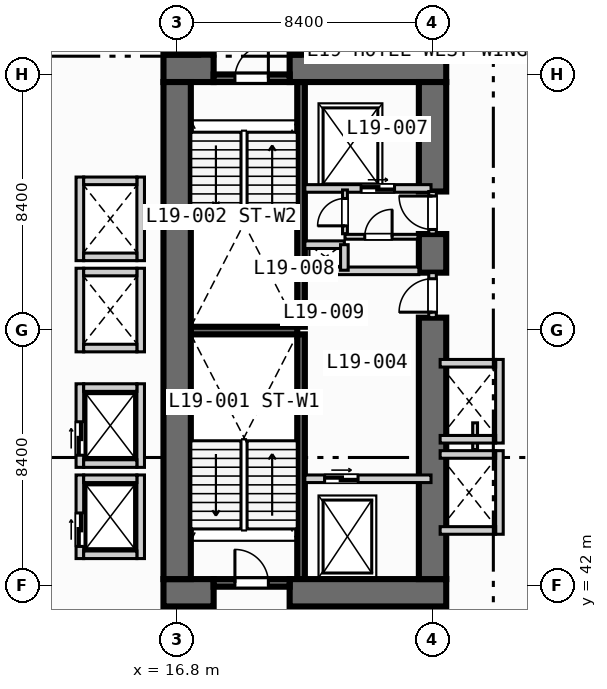
"""IFC4 building model, lengths in metres.
Left out: names, types, materials, properties, quantities, classifications, styles, units other than length and angle.
Written with IfcOpenShell. Run it as: python <this file> out.ifc"""

import sys

from ifc_helpers import new_model, si_unit, direction, frame, frame_2d, origin, place, context, subcontext, project, spatial, rectangle, extrude, element, fill, save


model = new_model("IFC4")
c1 = context("Model", 3, precision=1e-05, world=origin(), true_north=direction((0.0, 1.0)))
c2 = subcontext(c1, "Body", "Model", "MODEL_VIEW")
j1 = project(units=[si_unit("LENGTHUNIT", "METRE"), si_unit("PLANEANGLEUNIT", "RADIAN")], contexts=[c1])
p1 = place(None, origin())
s1 = spatial("IfcSite", under=j1, at=p1, CompositionType="ELEMENT")
p2 = place(p1, origin())
s2 = spatial("IfcBuilding", under=s1, at=p2, CompositionType="ELEMENT")
p3 = place(p2, frame((0.0, 0.0, 81.4)))
s3 = spatial("IfcBuildingStorey", under=s2, at=p3, CompositionType="ELEMENT", Elevation=81.4)
for number, where, z_axis, x_axis in (
    (1, (20.875, 42.2, 0.0), (0.0, 0.0, 1.0), (0.0, 1.0, 0.0)),
    (2, (20.875, 50.5, 0.0), (0.0, 0.0, 1.0), (0.0, 1.0, 0.0)),
):
    element("IfcWall", number, at=place(p3, frame(where, z_axis=z_axis, x_axis=x_axis)), inside=s3, PredefinedType="SOLIDWALL", context=c2, shape_type="SweptSolid", body=[
        extrude(rectangle(XDim=8.05, YDim=0.25, at=frame_2d((4.025, 0.0))), origin(), (0.0, 0.0, 1.0), 3.55),
    ])
p4 = place(p3, frame((17.25, 50.375, 0.0), z_axis=(0.0, 0.0, 1.0), x_axis=(1.0, 0.0, 0.0)))
e3 = element("IfcWall", 3, at=p4, inside=s3, PredefinedType="SOLIDWALL", context=c2, shape_type="SweptSolid", body=[
    extrude(rectangle(XDim=3.5, YDim=0.25, at=frame_2d((1.75, 0.0))), origin(), (0.0, 0.0, 1.0), 3.55),
])
p5 = place(p3, frame((16.35, 41.75, 0.0), z_axis=(0.0, 0.0, 1.0), x_axis=(1.0, 0.0, 0.0)))
e4 = element("IfcWall", 4, at=p5, inside=s3, PredefinedType="SHEAR", context=c2, shape_type="SweptSolid", body=[
    extrude(rectangle(XDim=1.65, YDim=0.9, at=frame_2d((0.825, 0.0))), origin(), (0.0, 0.0, 1.0), 3.55),
])
p6 = place(p3, frame((20.5, 41.75, 0.0), z_axis=(0.0, 0.0, 1.0), x_axis=(1.0, 0.0, 0.0)))
e5 = element("IfcWall", 5, at=p6, inside=s3, PredefinedType="SHEAR", context=c2, shape_type="SweptSolid", body=[
    extrude(rectangle(XDim=5.15, YDim=0.9, at=frame_2d((2.575, 0.0))), origin(), (0.0, 0.0, 1.0), 3.55),
])
p7 = place(p3, frame((16.35, 59.0, 0.0), z_axis=(0.0, 0.0, 1.0), x_axis=(1.0, 0.0, 0.0)))
e6 = element("IfcWall", 6, at=p7, inside=s3, PredefinedType="SHEAR", context=c2, shape_type="SweptSolid", body=[
    extrude(rectangle(XDim=1.65, YDim=0.9, at=frame_2d((0.825, 0.0))), origin(), (0.0, 0.0, 1.0), 3.55),
])
p8 = place(p3, frame((20.5, 59.0, 0.0), z_axis=(0.0, 0.0, 1.0), x_axis=(1.0, 0.0, 0.0)))
e7 = element("IfcWall", 7, at=p8, inside=s3, PredefinedType="SHEAR", context=c2, shape_type="SweptSolid", body=[
    extrude(rectangle(XDim=5.15, YDim=0.9, at=frame_2d((2.575, 0.0))), origin(), (0.0, 0.0, 1.0), 3.55),
])
p9 = place(p3, frame((16.8, 42.2, 0.0), z_axis=(0.0, 0.0, 1.0), x_axis=(0.0, 1.0, 0.0)))
e8 = element("IfcWall", 8, at=p9, inside=s3, PredefinedType="SHEAR", context=c2, shape_type="SweptSolid", body=[
    extrude(rectangle(XDim=16.35, YDim=0.9, at=frame_2d((8.175, 0.0))), origin(), (0.0, 0.0, 1.0), 3.55),
])
p10 = place(p3, frame((25.2, 42.2, 0.0), z_axis=(0.0, 0.0, 1.0), x_axis=(0.0, 1.0, 0.0)))
e9 = element("IfcWall", 9, at=p10, inside=s3, PredefinedType="SHEAR", context=c2, shape_type="SweptSolid", body=[
    extrude(rectangle(XDim=8.6, YDim=0.9, at=frame_2d((4.3, 0.0))), origin(), (0.0, 0.0, 1.0), 3.55),
])
p11 = place(p3, frame((25.2, 52.28, 0.0), z_axis=(0.0, 0.0, 1.0), x_axis=(0.0, 1.0, 0.0)))
e10 = element("IfcWall", 10, at=p11, inside=s3, PredefinedType="SHEAR", context=c2, shape_type="SweptSolid", body=[
    extrude(rectangle(XDim=1.27, YDim=0.9, at=frame_2d((0.635, 0.0))), origin(), (0.0, 0.0, 1.0), 3.55),
])
p12 = place(p3, frame((25.2, 54.95, 0.0), z_axis=(0.0, 0.0, 1.0), x_axis=(0.0, 1.0, 0.0)))
e11 = element("IfcWall", 11, at=p12, inside=s3, PredefinedType="SHEAR", context=c2, shape_type="SweptSolid", body=[
    extrude(rectangle(XDim=3.6, YDim=0.9, at=frame_2d((1.8, 0.0))), origin(), (0.0, 0.0, 1.0), 3.55),
])
p13 = place(p3, frame((18.0, 42.075, 0.0), z_axis=(0.0, 0.0, 1.0), x_axis=(1.0, 0.0, 0.0)))
e12 = element("IfcWall", 12, at=p13, inside=s3, PredefinedType="SOLIDWALL", context=c2, shape_type="SweptSolid", body=[
    extrude(rectangle(XDim=2.5, YDim=0.25, at=frame_2d((1.25, 0.0))), origin(), (0.0, 0.0, 1.0), 3.55),
])
p14 = place(p13, frame((0.7, 0.0, 0.0)))
e13 = element("IfcOpeningElement", 13, at=p14, cuts=e12, PredefinedType="OPENING", context=c2, shape_type="SweptSolid", body=[
    extrude(rectangle(XDim=1.1, YDim=2.15, at=frame_2d((0.55, 1.075))), frame((0.0, 0.135, 0.0), z_axis=(0.0, -1.0, 0.0), x_axis=(1.0, 0.0, 0.0)), (0.0, 0.0, 1.0), 0.27),
])
p15 = place(p3, frame((18.0, 58.675, 0.0), z_axis=(0.0, 0.0, 1.0), x_axis=(1.0, 0.0, 0.0)))
e14 = element("IfcWall", 14, at=p15, inside=s3, PredefinedType="SOLIDWALL", context=c2, shape_type="SweptSolid", body=[
    extrude(rectangle(XDim=2.5, YDim=0.25, at=frame_2d((1.25, 0.0))), origin(), (0.0, 0.0, 1.0), 3.55),
])
p16 = place(p15, frame((0.7, 0.0, 0.0)))
e15 = element("IfcOpeningElement", 15, at=p16, cuts=e14, PredefinedType="OPENING", context=c2, shape_type="SweptSolid", body=[
    extrude(rectangle(XDim=1.1, YDim=2.15, at=frame_2d((0.55, 1.075))), frame((0.0, 0.135, 0.0), z_axis=(0.0, -1.0, 0.0), x_axis=(1.0, 0.0, 0.0)), (0.0, 0.0, 1.0), 0.27),
])
p17 = place(p3, frame((21.0, 45.5, 0.0), z_axis=(0.0, 0.0, 1.0), x_axis=(1.0, 0.0, 0.0)))
e16 = element("IfcWall", 16, at=p17, inside=s3, PredefinedType="SOLIDWALL", context=c2, shape_type="SweptSolid", body=[
    extrude(rectangle(XDim=4.15, YDim=0.25, at=frame_2d((2.075, 0.0))), origin(), (0.0, 0.0, 1.0), 3.55),
])
p18 = place(p17, frame((0.65, 0.0, 0.0)))
e17 = element("IfcOpeningElement", 17, at=p18, cuts=e16, PredefinedType="OPENING", context=c2, shape_type="SweptSolid", body=[
    extrude(rectangle(XDim=1.1, YDim=2.15, at=frame_2d((0.55, 1.075))), frame((0.0, 0.135, 0.0), z_axis=(0.0, -1.0, 0.0), x_axis=(1.0, 0.0, 0.0)), (0.0, 0.0, 1.0), 0.27),
])
p19 = place(p3, frame((25.2, 50.8, 0.0), z_axis=(0.0, 0.0, 1.0), x_axis=(0.0, 1.0, 0.0)))
e18 = element("IfcWall", 18, at=p19, inside=s3, PredefinedType="SOLIDWALL", context=c2, shape_type="SweptSolid", body=[
    extrude(rectangle(XDim=1.48, YDim=0.25, at=frame_2d((0.74, 0.0))), origin(), (0.0, 0.0, 1.0), 3.55),
])
p20 = place(p19, frame((0.18, 0.0, 0.0)))
e19 = element("IfcOpeningElement", 19, at=p20, cuts=e18, PredefinedType="OPENING", context=c2, shape_type="SweptSolid", body=[
    extrude(rectangle(XDim=1.1, YDim=2.15, at=frame_2d((0.55, 1.075))), frame((0.0, 0.135, 0.0), z_axis=(0.0, -1.0, 0.0), x_axis=(1.0, 0.0, 0.0)), (0.0, 0.0, 1.0), 0.27),
])
p21 = place(p3, frame((21.0, 52.34, 0.0), z_axis=(0.0, 0.0, 1.0), x_axis=(1.0, 0.0, 0.0)))
e20 = element("IfcWall", 20, at=p21, inside=s3, PredefinedType="SOLIDWALL", context=c2, shape_type="SweptSolid", body=[
    extrude(rectangle(XDim=3.75, YDim=0.25, at=frame_2d((1.875, 0.0))), origin(), (0.0, 0.0, 1.0), 3.55),
])
p22 = place(p3, frame((21.0, 55.05, 0.0), z_axis=(0.0, 0.0, 1.0), x_axis=(1.0, 0.0, 0.0)))
e21 = element("IfcWall", 21, at=p22, inside=s3, PredefinedType="SOLIDWALL", context=c2, shape_type="SweptSolid", body=[
    extrude(rectangle(XDim=4.15, YDim=0.25, at=frame_2d((2.075, 0.0))), origin(), (0.0, 0.0, 1.0), 3.55),
])
p23 = place(p22, frame((1.85, 0.0, 0.0)))
e22 = element("IfcOpeningElement", 22, at=p23, cuts=e21, PredefinedType="OPENING", context=c2, shape_type="SweptSolid", body=[
    extrude(rectangle(XDim=1.1, YDim=2.15, at=frame_2d((0.55, 1.075))), frame((0.0, 0.135, 0.0), z_axis=(0.0, -1.0, 0.0), x_axis=(1.0, 0.0, 0.0)), (0.0, 0.0, 1.0), 0.27),
])
p24 = place(p3, frame((25.2, 53.55, 0.0), z_axis=(0.0, 0.0, 1.0), x_axis=(0.0, 1.0, 0.0)))
e23 = element("IfcWall", 23, at=p24, inside=s3, PredefinedType="SOLIDWALL", context=c2, shape_type="SweptSolid", body=[
    extrude(rectangle(XDim=1.4, YDim=0.25, at=frame_2d((0.7, 0.0))), origin(), (0.0, 0.0, 1.0), 3.55),
])
p25 = place(p24, frame((0.15, 0.0, 0.0)))
e24 = element("IfcOpeningElement", 24, at=p25, cuts=e23, PredefinedType="OPENING", context=c2, shape_type="SweptSolid", body=[
    extrude(rectangle(XDim=1.1, YDim=2.15, at=frame_2d((0.55, 1.075))), frame((0.0, 0.135, 0.0), z_axis=(0.0, -1.0, 0.0), x_axis=(1.0, 0.0, 0.0)), (0.0, 0.0, 1.0), 0.27),
])
p26 = place(p3, frame((21.0, 53.2, 0.0), z_axis=(0.0, 0.0, 1.0), x_axis=(1.0, 0.0, 0.0)))
e25 = element("IfcWall", 25, at=p26, inside=s3, PredefinedType="SOLIDWALL", context=c2, shape_type="SweptSolid", body=[
    extrude(rectangle(XDim=1.3, YDim=0.25, at=frame_2d((0.65, 0.0))), origin(), (0.0, 0.0, 1.0), 3.55),
])
p27 = place(p3, frame((22.3, 52.36, 0.0), z_axis=(0.0, 0.0, 1.0), x_axis=(0.0, 1.0, 0.0)))
e26 = element("IfcWall", 26, at=p27, inside=s3, PredefinedType="SOLIDWALL", context=c2, shape_type="SweptSolid", body=[
    extrude(rectangle(XDim=0.84, YDim=0.25, at=frame_2d((0.42, 0.0))), origin(), (0.0, 0.0, 1.0), 3.55),
])
p28 = place(p3, frame((22.32, 53.56, 0.0), z_axis=(0.0, 0.0, 1.0), x_axis=(0.0, 1.0, 0.0)))
e27 = element("IfcWall", 27, at=p28, inside=s3, PredefinedType="PARTITIONING", context=c2, shape_type="SweptSolid", body=[
    extrude(rectangle(XDim=1.44, YDim=0.16, at=frame_2d((0.72, 0.0))), origin(), (0.0, 0.0, 1.0), 3.55),
])
p29 = place(p28, frame((0.26, 0.0, 0.0)))
e28 = element("IfcOpeningElement", 28, at=p29, cuts=e27, PredefinedType="OPENING", context=c2, shape_type="SweptSolid", body=[
    extrude(rectangle(XDim=0.9, YDim=2.1, at=frame_2d((0.45, 1.05))), frame((0.0, 0.09, 0.0), z_axis=(0.0, -1.0, 0.0), x_axis=(1.0, 0.0, 0.0)), (0.0, 0.0, 1.0), 0.18),
])
p30 = place(p3, frame((22.32, 53.46, 0.0), z_axis=(0.0, 0.0, 1.0), x_axis=(1.0, 0.0, 0.0)))
e29 = element("IfcWall", 29, at=p30, inside=s3, PredefinedType="PARTITIONING", context=c2, shape_type="SweptSolid", body=[
    extrude(rectangle(XDim=2.4, YDim=0.16, at=frame_2d((1.2, 0.0))), origin(), (0.0, 0.0, 1.0), 3.55),
])
p31 = place(p30, frame((0.65, 0.0, 0.0)))
e30 = element("IfcOpeningElement", 30, at=p31, cuts=e29, PredefinedType="OPENING", context=c2, shape_type="SweptSolid", body=[
    extrude(rectangle(XDim=0.9, YDim=2.1, at=frame_2d((0.45, 1.05))), frame((0.0, 0.09, 0.0), z_axis=(0.0, -1.0, 0.0), x_axis=(1.0, 0.0, 0.0)), (0.0, 0.0, 1.0), 0.18),
])
p32 = place(p3, frame((13.6, 42.875, 0.0), z_axis=(0.0, 0.0, 1.0), x_axis=(0.0, 1.0, 0.0)))
e31 = element("IfcWall", 31, at=p32, inside=s3, PredefinedType="SOLIDWALL", context=c2, shape_type="SweptSolid", body=[
    extrude(rectangle(XDim=2.75, YDim=0.25, at=frame_2d((1.375, 0.0))), origin(), (0.0, 0.0, 1.0), 3.55),
])
p33 = place(p32, frame((0.4, 0.0, 0.0)))
e32 = element("IfcOpeningElement", 32, at=p33, cuts=e31, PredefinedType="OPENING", context=c2, shape_type="SweptSolid", body=[
    extrude(rectangle(XDim=1.1, YDim=2.15, at=frame_2d((0.55, 1.075))), frame((0.0, 0.135, 0.0), z_axis=(0.0, -1.0, 0.0), x_axis=(1.0, 0.0, 0.0)), (0.0, 0.0, 1.0), 0.27),
])
p34 = place(p3, frame((15.6, 42.875, 0.0), z_axis=(0.0, 0.0, 1.0), x_axis=(0.0, 1.0, 0.0)))
e33 = element("IfcWall", 33, at=p34, inside=s3, PredefinedType="SOLIDWALL", context=c2, shape_type="SweptSolid", body=[
    extrude(rectangle(XDim=2.75, YDim=0.25, at=frame_2d((1.375, 0.0))), origin(), (0.0, 0.0, 1.0), 3.55),
])
for number, where, z_axis, x_axis in (
    (34, (13.725, 43.0, 0.0), (0.0, 0.0, 1.0), (1.0, 0.0, 0.0)),
    (35, (13.725, 45.5, 0.0), (0.0, 0.0, 1.0), (1.0, 0.0, 0.0)),
):
    element("IfcWall", number, at=place(p3, frame(where, z_axis=z_axis, x_axis=x_axis)), inside=s3, PredefinedType="SOLIDWALL", context=c2, shape_type="SweptSolid", body=[
        extrude(rectangle(XDim=1.75, YDim=0.25, at=frame_2d((0.875, 0.0))), origin(), (0.0, 0.0, 1.0), 3.55),
    ])
p35 = place(p3, frame((13.6, 45.875, 0.0), z_axis=(0.0, 0.0, 1.0), x_axis=(0.0, 1.0, 0.0)))
e36 = element("IfcWall", 36, at=p35, inside=s3, PredefinedType="SOLIDWALL", context=c2, shape_type="SweptSolid", body=[
    extrude(rectangle(XDim=2.75, YDim=0.25, at=frame_2d((1.375, 0.0))), origin(), (0.0, 0.0, 1.0), 3.55),
])
p36 = place(p35, frame((0.4, 0.0, 0.0)))
e37 = element("IfcOpeningElement", 37, at=p36, cuts=e36, PredefinedType="OPENING", context=c2, shape_type="SweptSolid", body=[
    extrude(rectangle(XDim=1.1, YDim=2.15, at=frame_2d((0.55, 1.075))), frame((0.0, 0.135, 0.0), z_axis=(0.0, -1.0, 0.0), x_axis=(1.0, 0.0, 0.0)), (0.0, 0.0, 1.0), 0.27),
])
p37 = place(p3, frame((15.6, 45.875, 0.0), z_axis=(0.0, 0.0, 1.0), x_axis=(0.0, 1.0, 0.0)))
e38 = element("IfcWall", 38, at=p37, inside=s3, PredefinedType="SOLIDWALL", context=c2, shape_type="SweptSolid", body=[
    extrude(rectangle(XDim=2.75, YDim=0.25, at=frame_2d((1.375, 0.0))), origin(), (0.0, 0.0, 1.0), 3.55),
])
for number, where, z_axis, x_axis in (
    (39, (13.725, 46.0, 0.0), (0.0, 0.0, 1.0), (1.0, 0.0, 0.0)),
    (40, (13.725, 48.5, 0.0), (0.0, 0.0, 1.0), (1.0, 0.0, 0.0)),
):
    element("IfcWall", number, at=place(p3, frame(where, z_axis=z_axis, x_axis=x_axis)), inside=s3, PredefinedType="SOLIDWALL", context=c2, shape_type="SweptSolid", body=[
        extrude(rectangle(XDim=1.75, YDim=0.25, at=frame_2d((0.875, 0.0))), origin(), (0.0, 0.0, 1.0), 3.55),
    ])
for number, where, z_axis, x_axis in (
    (41, (13.6, 49.675, 0.0), (0.0, 0.0, 1.0), (0.0, 1.0, 0.0)),
    (42, (15.6, 49.675, 0.0), (0.0, 0.0, 1.0), (0.0, 1.0, 0.0)),
):
    element("IfcWall", number, at=place(p3, frame(where, z_axis=z_axis, x_axis=x_axis)), inside=s3, PredefinedType="SOLIDWALL", context=c2, shape_type="SweptSolid", body=[
        extrude(rectangle(XDim=2.75, YDim=0.25, at=frame_2d((1.375, 0.0))), origin(), (0.0, 0.0, 1.0), 3.55),
    ])
for number, where, z_axis, x_axis in (
    (43, (13.725, 49.8, 0.0), (0.0, 0.0, 1.0), (1.0, 0.0, 0.0)),
    (44, (13.725, 52.3, 0.0), (0.0, 0.0, 1.0), (1.0, 0.0, 0.0)),
):
    element("IfcWall", number, at=place(p3, frame(where, z_axis=z_axis, x_axis=x_axis)), inside=s3, PredefinedType="SOLIDWALL", context=c2, shape_type="SweptSolid", body=[
        extrude(rectangle(XDim=1.75, YDim=0.25, at=frame_2d((0.875, 0.0))), origin(), (0.0, 0.0, 1.0), 3.55),
    ])
for number, where, z_axis, x_axis in (
    (45, (13.6, 52.675, 0.0), (0.0, 0.0, 1.0), (0.0, 1.0, 0.0)),
    (46, (15.6, 52.675, 0.0), (0.0, 0.0, 1.0), (0.0, 1.0, 0.0)),
):
    element("IfcWall", number, at=place(p3, frame(where, z_axis=z_axis, x_axis=x_axis)), inside=s3, PredefinedType="SOLIDWALL", context=c2, shape_type="SweptSolid", body=[
        extrude(rectangle(XDim=2.75, YDim=0.25, at=frame_2d((1.375, 0.0))), origin(), (0.0, 0.0, 1.0), 3.55),
    ])
for number, where, z_axis, x_axis in (
    (47, (13.725, 52.8, 0.0), (0.0, 0.0, 1.0), (1.0, 0.0, 0.0)),
    (48, (13.725, 55.3, 0.0), (0.0, 0.0, 1.0), (1.0, 0.0, 0.0)),
):
    element("IfcWall", number, at=place(p3, frame(where, z_axis=z_axis, x_axis=x_axis)), inside=s3, PredefinedType="SOLIDWALL", context=c2, shape_type="SweptSolid", body=[
        extrude(rectangle(XDim=1.75, YDim=0.25, at=frame_2d((0.875, 0.0))), origin(), (0.0, 0.0, 1.0), 3.55),
    ])
p38 = place(p3, frame((27.4, 43.675, 0.0), z_axis=(0.0, 0.0, 1.0), x_axis=(0.0, 1.0, 0.0)))
e49 = element("IfcWall", 49, at=p38, inside=s3, PredefinedType="SOLIDWALL", context=c2, shape_type="SweptSolid", body=[
    extrude(rectangle(XDim=2.75, YDim=0.25, at=frame_2d((1.375, 0.0))), origin(), (0.0, 0.0, 1.0), 3.55),
])
for number, where, z_axis, x_axis in (
    (50, (25.45, 43.8, 0.0), (0.0, 0.0, 1.0), (1.0, 0.0, 0.0)),
    (51, (25.45, 46.3, 0.0), (0.0, 0.0, 1.0), (1.0, 0.0, 0.0)),
):
    element("IfcWall", number, at=place(p3, frame(where, z_axis=z_axis, x_axis=x_axis)), inside=s3, PredefinedType="SOLIDWALL", context=c2, shape_type="SweptSolid", body=[
        extrude(rectangle(XDim=1.825, YDim=0.25, at=frame_2d((0.913, 0.0))), origin(), (0.0, 0.0, 1.0), 3.55),
    ])
p39 = place(p3, frame((26.6, 46.46, 0.0), z_axis=(0.0, 0.0, 1.0), x_axis=(0.0, 1.0, 0.0)))
e52 = element("IfcWall", 52, at=p39, inside=s3, PredefinedType="PARTITIONING", context=c2, shape_type="SweptSolid", body=[
    extrude(rectangle(XDim=0.88, YDim=0.16, at=frame_2d((0.44, 0.0))), origin(), (0.0, 0.0, 1.0), 3.55),
])
p40 = place(p3, frame((27.4, 46.675, 0.0), z_axis=(0.0, 0.0, 1.0), x_axis=(0.0, 1.0, 0.0)))
e53 = element("IfcWall", 53, at=p40, inside=s3, PredefinedType="SOLIDWALL", context=c2, shape_type="SweptSolid", body=[
    extrude(rectangle(XDim=2.75, YDim=0.25, at=frame_2d((1.375, 0.0))), origin(), (0.0, 0.0, 1.0), 3.55),
])
for number, where, z_axis, x_axis in (
    (54, (25.45, 46.8, 0.0), (0.0, 0.0, 1.0), (1.0, 0.0, 0.0)),
    (55, (25.45, 49.3, 0.0), (0.0, 0.0, 1.0), (1.0, 0.0, 0.0)),
):
    element("IfcWall", number, at=place(p3, frame(where, z_axis=z_axis, x_axis=x_axis)), inside=s3, PredefinedType="SOLIDWALL", context=c2, shape_type="SweptSolid", body=[
        extrude(rectangle(XDim=1.825, YDim=0.25, at=frame_2d((0.913, 0.0))), origin(), (0.0, 0.0, 1.0), 3.55),
    ])
p41 = place(p14, origin())
e56 = element("IfcDoor", 56, at=p41, inside=s3, OperationType="SINGLE_SWING_LEFT", PredefinedType="DOOR", context=c2, shape_type="SweptSolid", body=[
    extrude(rectangle(XDim=1.1, YDim=2.15, at=frame_2d((0.55, 1.075))), frame((0.0, 0.025, 0.0), z_axis=(0.0, -1.0, 0.0), x_axis=(1.0, 0.0, 0.0)), (0.0, 0.0, 1.0), 0.05),
])
fill(e13, e56)
p42 = place(p16, origin())
e57 = element("IfcDoor", 57, at=p42, inside=s3, OperationType="SINGLE_SWING_RIGHT", PredefinedType="DOOR", context=c2, shape_type="SweptSolid", body=[
    extrude(rectangle(XDim=1.1, YDim=2.15, at=frame_2d((0.55, 1.075))), frame((0.0, 0.025, 0.0), z_axis=(0.0, -1.0, 0.0), x_axis=(1.0, 0.0, 0.0)), (0.0, 0.0, 1.0), 0.05),
])
fill(e15, e57)
p43 = place(p18, origin())
e58 = element("IfcDoor", 58, at=p43, inside=s3, OperationType="SLIDING_TO_LEFT", PredefinedType="DOOR", context=c2, shape_type="SweptSolid", body=[
    extrude(rectangle(XDim=1.1, YDim=2.15, at=frame_2d((0.55, 1.075))), frame((0.0, 0.025, 0.0), z_axis=(0.0, -1.0, 0.0), x_axis=(1.0, 0.0, 0.0)), (0.0, 0.0, 1.0), 0.05),
])
fill(e17, e58)
p44 = place(p20, origin())
e59 = element("IfcDoor", 59, at=p44, inside=s3, OperationType="SINGLE_SWING_LEFT", PredefinedType="DOOR", context=c2, shape_type="SweptSolid", body=[
    extrude(rectangle(XDim=1.1, YDim=2.15, at=frame_2d((0.55, 1.075))), frame((0.0, 0.025, 0.0), z_axis=(0.0, -1.0, 0.0), x_axis=(1.0, 0.0, 0.0)), (0.0, 0.0, 1.0), 0.05),
])
fill(e19, e59)
p45 = place(p23, origin())
e60 = element("IfcDoor", 60, at=p45, inside=s3, OperationType="SLIDING_TO_LEFT", PredefinedType="DOOR", context=c2, shape_type="SweptSolid", body=[
    extrude(rectangle(XDim=1.1, YDim=2.15, at=frame_2d((0.55, 1.075))), frame((0.0, 0.025, 0.0), z_axis=(0.0, -1.0, 0.0), x_axis=(1.0, 0.0, 0.0)), (0.0, 0.0, 1.0), 0.05),
])
fill(e22, e60)
p46 = place(p25, origin())
e61 = element("IfcDoor", 61, at=p46, inside=s3, OperationType="SINGLE_SWING_RIGHT", PredefinedType="DOOR", context=c2, shape_type="SweptSolid", body=[
    extrude(rectangle(XDim=1.1, YDim=2.15, at=frame_2d((0.55, 1.075))), frame((0.0, 0.025, 0.0), z_axis=(0.0, -1.0, 0.0), x_axis=(1.0, 0.0, 0.0)), (0.0, 0.0, 1.0), 0.05),
])
fill(e24, e61)
p47 = place(p29, origin())
e62 = element("IfcDoor", 62, at=p47, inside=s3, OperationType="SINGLE_SWING_LEFT", PredefinedType="DOOR", context=c2, shape_type="SweptSolid", body=[
    extrude(rectangle(XDim=0.9, YDim=2.1, at=frame_2d((0.45, 1.05))), frame((0.0, 0.025, 0.0), z_axis=(0.0, -1.0, 0.0), x_axis=(1.0, 0.0, 0.0)), (0.0, 0.0, 1.0), 0.05),
])
fill(e28, e62)
p48 = place(p31, origin())
e63 = element("IfcDoor", 63, at=p48, inside=s3, OperationType="SINGLE_SWING_RIGHT", PredefinedType="DOOR", context=c2, shape_type="SweptSolid", body=[
    extrude(rectangle(XDim=0.9, YDim=2.1, at=frame_2d((0.45, 1.05))), frame((0.0, 0.025, 0.0), z_axis=(0.0, -1.0, 0.0), x_axis=(1.0, 0.0, 0.0)), (0.0, 0.0, 1.0), 0.05),
])
fill(e30, e63)
p49 = place(p33, origin())
e64 = element("IfcDoor", 64, at=p49, inside=s3, OperationType="SLIDING_TO_LEFT", PredefinedType="DOOR", context=c2, shape_type="SweptSolid", body=[
    extrude(rectangle(XDim=1.1, YDim=2.15, at=frame_2d((0.55, 1.075))), frame((0.0, 0.025, 0.0), z_axis=(0.0, -1.0, 0.0), x_axis=(1.0, 0.0, 0.0)), (0.0, 0.0, 1.0), 0.05),
])
fill(e32, e64)
p50 = place(p36, origin())
e65 = element("IfcDoor", 65, at=p50, inside=s3, OperationType="SLIDING_TO_LEFT", PredefinedType="DOOR", context=c2, shape_type="SweptSolid", body=[
    extrude(rectangle(XDim=1.1, YDim=2.15, at=frame_2d((0.55, 1.075))), frame((0.0, 0.025, 0.0), z_axis=(0.0, -1.0, 0.0), x_axis=(1.0, 0.0, 0.0)), (0.0, 0.0, 1.0), 0.05),
])
fill(e37, e65)
save(model, sys.argv[1])
